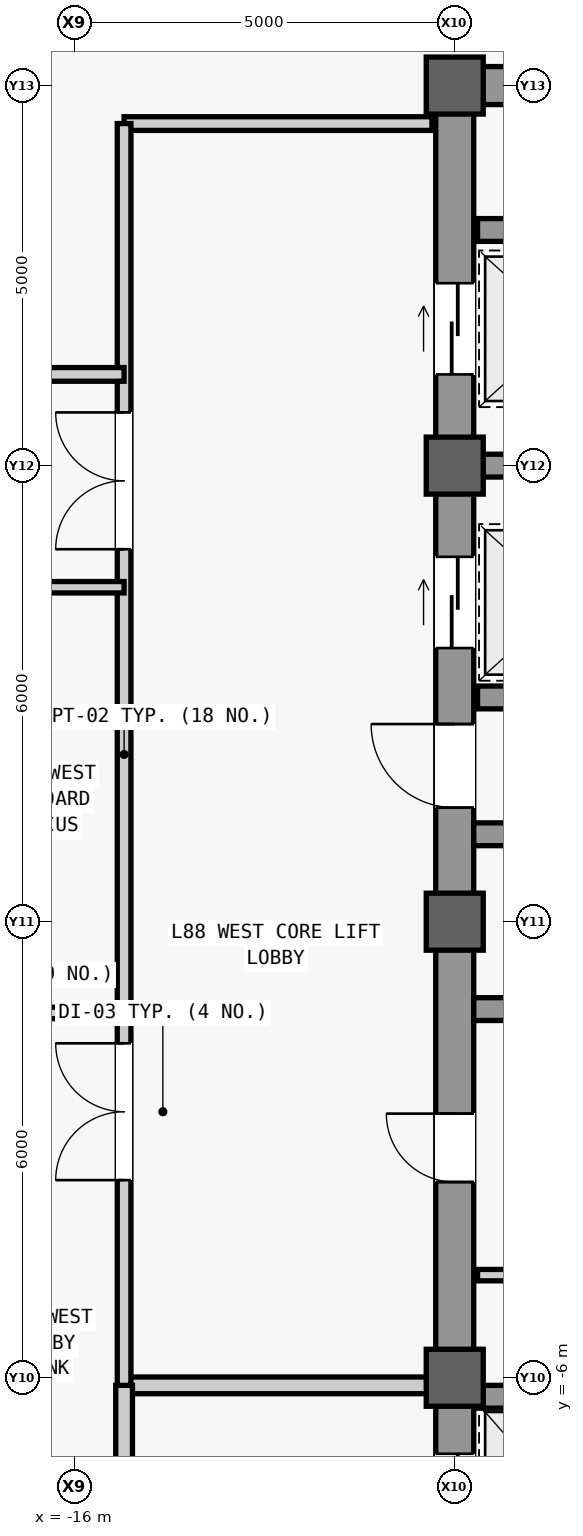
"""IFC4 building model, lengths in metres.
Left out: names, types, materials, properties, quantities, classifications, styles, units other than length and angle.
Written with IfcOpenShell. Run it as: python <this file> out.ifc"""

import sys

from ifc_helpers import new_model, si_unit, direction, frame, frame_2d, origin, origin_2d, place, context, subcontext, project, spatial, rectangle, extrude, source, transform, mapped, element, fill, save


model = new_model("IFC4")
c1 = context("Model", 3, precision=1e-05, world=origin(), true_north=direction((0.0, 1.0)))
c2 = subcontext(c1, "Body", "Model", "MODEL_VIEW")
j1 = project(units=[si_unit("LENGTHUNIT", "METRE"), si_unit("PLANEANGLEUNIT", "RADIAN")], contexts=[c1])
p1 = place(None, origin())
s1 = spatial("IfcSite", under=j1, at=p1, CompositionType="ELEMENT")
p2 = place(p1, origin())
s2 = spatial("IfcBuilding", under=s1, at=p2, CompositionType="ELEMENT")
p3 = place(p2, frame((0.0, 0.0, 370.3)))
s3 = spatial("IfcBuildingStorey", under=s2, at=p3, CompositionType="ELEMENT", Elevation=370.3)
m1 = source(origin(), c2, "Body", "SweptSolid", [
    extrude(rectangle(XDim=22.0, YDim=0.5, at=frame_2d((11.0, 0.0))), origin(), (0.0, 0.0, 1.0), 4.6),
])
p4 = place(p3, frame((-11.0, -11.0, 0.0), z_axis=(0.0, 0.0, 1.0), x_axis=(0.0, 1.0, 0.0)))
e1 = element("IfcWall", 1, at=p4, inside=s3, PredefinedType="SHEAR", context=c2, shape_type="MappedRepresentation", body=[
    mapped(m1, transform((0.0, 0.0, 0.0), scale=1.0)),
])
m2 = source(origin(), c2, "Body", "SweptSolid", [
    extrude(rectangle(XDim=1.1, YDim=2.2, at=frame_2d((0.55, 1.1))), frame((0.0, 0.26, 0.0), z_axis=(0.0, -1.0, 0.0), x_axis=(1.0, 0.0, 0.0)), (0.0, 0.0, 1.0), 0.52),
])
p5 = place(p4, frame((0.8, 0.0, 0.0)))
e2 = element("IfcOpeningElement", 2, at=p5, cuts=e1, PredefinedType="OPENING", context=c2, shape_type="MappedRepresentation", body=[
    mapped(m2, transform((0.0, 0.0, 0.0), scale=1.0)),
])
p6 = place(p4, frame((12.5, 0.0, 0.0)))
e3 = element("IfcOpeningElement", 3, at=p6, cuts=e1, PredefinedType="OPENING", context=c2, shape_type="MappedRepresentation", body=[
    mapped(m2, transform((0.0, 0.0, 0.0), scale=1.0)),
])
m3 = source(origin(), c2, "Body", "SweptSolid", [
    extrude(rectangle(XDim=0.9, YDim=2.15, at=frame_2d((0.45, 1.075))), frame((0.0, 0.26, 0.0), z_axis=(0.0, -1.0, 0.0), x_axis=(1.0, 0.0, 0.0)), (0.0, 0.0, 1.0), 0.52),
])
p7 = place(p4, frame((7.575, 0.0, 0.0)))
e4 = element("IfcOpeningElement", 4, at=p7, cuts=e1, PredefinedType="OPENING", context=c2, shape_type="MappedRepresentation", body=[
    mapped(m3, transform((0.0, 0.0, 0.0), scale=1.0)),
])
m4 = source(origin(), c2, "Body", "SweptSolid", [
    extrude(rectangle(XDim=1.2, YDim=2.3, at=frame_2d((0.6, 1.15))), frame((0.0, 0.26, 0.0), z_axis=(0.0, -1.0, 0.0), x_axis=(1.0, 0.0, 0.0)), (0.0, 0.0, 1.0), 0.52),
])
p8 = place(p4, frame((14.6, 0.0, 0.0)))
e5 = element("IfcOpeningElement", 5, at=p8, cuts=e1, PredefinedType="OPENING", context=c2, shape_type="MappedRepresentation", body=[
    mapped(m4, transform((0.0, 0.0, 0.0), scale=1.0)),
])
p9 = place(p4, frame((18.2, 0.0, 0.0)))
e6 = element("IfcOpeningElement", 6, at=p9, cuts=e1, PredefinedType="OPENING", context=c2, shape_type="MappedRepresentation", body=[
    mapped(m4, transform((0.0, 0.0, 0.0), scale=1.0)),
])
m5 = source(origin(), c2, "Body", "SweptSolid", [
    extrude(rectangle(XDim=1.3, YDim=2.3, at=frame_2d((0.65, 1.15))), frame((0.0, 0.26, 0.0), z_axis=(0.0, -1.0, 0.0), x_axis=(1.0, 0.0, 0.0)), (0.0, 0.0, 1.0), 0.52),
])
p10 = place(p4, frame((2.7, 0.0, 0.0)))
e7 = element("IfcOpeningElement", 7, at=p10, cuts=e1, PredefinedType="OPENING", context=c2, shape_type="MappedRepresentation", body=[
    mapped(m5, transform((0.0, 0.0, 0.0), scale=1.0)),
])
m6 = source(origin(), c2, "Body", "SweptSolid", [
    extrude(rectangle(XDim=5.9, YDim=0.5, at=frame_2d((2.95, 0.0))), origin(), (0.0, 0.0, 1.0), 4.6),
])
p11 = place(p3, frame((-10.75, 11.0, 0.0), z_axis=(0.0, 0.0, 1.0), x_axis=(1.0, 0.0, 0.0)))
e8 = element("IfcWall", 8, at=p11, inside=s3, PredefinedType="SHEAR", context=c2, shape_type="MappedRepresentation", body=[
    mapped(m6, transform((0.0, 0.0, 0.0), scale=1.0)),
])
m7 = source(origin(), c2, "Body", "SweptSolid", [
    extrude(rectangle(XDim=5.65, YDim=0.3, at=frame_2d((2.825, 0.0))), origin(), (0.0, 0.0, 1.0), 4.6),
])
for number, where, z_axis, x_axis in (
    (9, (-10.75, -1.15, 0.0), (0.0, 0.0, 1.0), (1.0, 0.0, 0.0)),
    (10, (-10.75, 1.15, 0.0), (0.0, 0.0, 1.0), (1.0, 0.0, 0.0)),
):
    element("IfcWall", number, at=place(p3, frame(where, z_axis=z_axis, x_axis=x_axis)), inside=s3, PredefinedType="SHEAR", context=c2, shape_type="MappedRepresentation", body=[
        mapped(m7, transform((0.0, 0.0, 0.0), scale=1.0)),
    ])
m8 = source(origin(), c2, "Body", "SweptSolid", [
    extrude(rectangle(XDim=0.75, YDim=0.75, at=origin_2d()), origin(), (0.0, 0.0, 1.0), 5.2),
])
for number, where, z_axis, x_axis in (
    (11, (-11.0, -6.0, 0.0), (0.0, 0.0, 1.0), (1.0, 0.0, 0.0)),
    (12, (-11.0, 0.0, 0.0), (0.0, 0.0, 1.0), (1.0, 0.0, 0.0)),
    (13, (-11.0, 6.0, 0.0), (0.0, 0.0, 1.0), (1.0, 0.0, 0.0)),
    (14, (-11.0, 11.0, 0.0), (0.0, 0.0, 1.0), (1.0, 0.0, 0.0)),
):
    element("IfcColumn", number, at=place(p3, frame(where, z_axis=z_axis, x_axis=x_axis)), inside=s3, PredefinedType="COLUMN", context=c2, shape_type="MappedRepresentation", body=[
        mapped(m8, transform((0.0, 0.0, 0.0), scale=1.0)),
    ])
m9 = source(origin(), c2, "Body", "SweptSolid", [
    extrude(rectangle(XDim=2.2, YDim=0.3, at=frame_2d((1.1, 0.0))), origin(), (0.0, 0.0, 1.0), 4.6),
])
for number, where, z_axis, x_axis in (
    (15, (-10.7, -6.25, 0.0), (0.0, 0.0, 1.0), (1.0, 0.0, 0.0)),
    (16, (-10.7, 2.95, 0.0), (0.0, 0.0, 1.0), (1.0, 0.0, 0.0)),
    (17, (-10.7, 6.0, 0.0), (0.0, 0.0, 1.0), (1.0, 0.0, 0.0)),
    (18, (-10.7, 9.1, 0.0), (0.0, 0.0, 1.0), (1.0, 0.0, 0.0)),
):
    element("IfcWall", number, at=place(p3, frame(where, z_axis=z_axis, x_axis=x_axis)), inside=s3, PredefinedType="SHEAR", context=c2, shape_type="MappedRepresentation", body=[
        mapped(m9, transform((0.0, 0.0, 0.0), scale=1.0)),
    ])
m10 = source(origin(), c2, "Body", "SweptSolid", [
    extrude(rectangle(XDim=2.05, YDim=0.15, at=frame_2d((1.025, 0.0))), origin(), (0.0, 0.0, 1.0), 4.6),
])
p12 = place(p3, frame((-10.7, -4.65, 0.0), z_axis=(0.0, 0.0, 1.0), x_axis=(1.0, 0.0, 0.0)))
e19 = element("IfcWall", 19, at=p12, inside=s3, PredefinedType="PARTITIONING", context=c2, shape_type="MappedRepresentation", body=[
    mapped(m10, transform((0.0, 0.0, 0.0), scale=1.0)),
])
m11 = source(origin(), c2, "Body", "SweptSolid", [
    extrude(rectangle(XDim=4.05, YDim=0.22, at=frame_2d((2.025, 0.0))), origin(), (0.0, 0.0, 1.0), 2.8),
])
p13 = place(p3, frame((-15.35, -6.1, 0.0), z_axis=(0.0, 0.0, 1.0), x_axis=(1.0, 0.0, 0.0)))
e20 = element("IfcWall", 20, at=p13, inside=s3, PredefinedType="PARTITIONING", context=c2, shape_type="MappedRepresentation", body=[
    mapped(m11, transform((0.0, 0.0, 0.0), scale=1.0)),
])
m12 = source(origin(), c2, "Body", "SweptSolid", [
    extrude(rectangle(XDim=4.4, YDim=0.22, at=frame_2d((2.2, 0.0))), origin(), (0.0, 0.0, 1.0), 4.6),
])
p14 = place(p3, frame((-15.35, -10.5, 0.0), z_axis=(0.0, 0.0, 1.0), x_axis=(0.0, 1.0, 0.0)))
e21 = element("IfcWall", 21, at=p14, inside=s3, PredefinedType="PARTITIONING", context=c2, shape_type="MappedRepresentation", body=[
    mapped(m12, transform((0.0, 0.0, 0.0), scale=1.0)),
])
m13 = source(origin(), c2, "Body", "SweptSolid", [
    extrude(rectangle(XDim=1.2, YDim=2.2, at=frame_2d((0.6, 1.1))), frame((0.0, 0.12, 0.0), z_axis=(0.0, -1.0, 0.0), x_axis=(1.0, 0.0, 0.0)), (0.0, 0.0, 1.0), 0.24),
])
p15 = place(p14, frame((1.6, 0.0, 0.0)))
e22 = element("IfcOpeningElement", 22, at=p15, cuts=e21, PredefinedType="OPENING", context=c2, shape_type="MappedRepresentation", body=[
    mapped(m13, transform((0.0, 0.0, 0.0), scale=1.0)),
])
m14 = source(origin(), c2, "Body", "SweptSolid", [
    extrude(rectangle(XDim=4.05, YDim=0.18, at=frame_2d((2.025, 0.0))), origin(), (0.0, 0.0, 1.0), 4.6),
])
p16 = place(p3, frame((-15.35, 10.5, 0.0), z_axis=(0.0, 0.0, 1.0), x_axis=(1.0, 0.0, 0.0)))
e23 = element("IfcWall", 23, at=p16, inside=s3, PredefinedType="PARTITIONING", context=c2, shape_type="MappedRepresentation", body=[
    mapped(m14, transform((0.0, 0.0, 0.0), scale=1.0)),
])
m15 = source(origin(), c2, "Body", "SweptSolid", [
    extrude(rectangle(XDim=16.6, YDim=0.18, at=frame_2d((8.3, 0.0))), origin(), (0.0, 0.0, 1.0), 4.6),
])
p17 = place(p3, frame((-15.35, -6.1, 0.0), z_axis=(0.0, 0.0, 1.0), x_axis=(0.0, 1.0, 0.0)))
e24 = element("IfcWall", 24, at=p17, inside=s3, PredefinedType="PARTITIONING", context=c2, shape_type="MappedRepresentation", body=[
    mapped(m15, transform((0.0, 0.0, 0.0), scale=1.0)),
])
m16 = source(origin(), c2, "Body", "SweptSolid", [
    extrude(rectangle(XDim=1.8, YDim=2.25, at=frame_2d((0.9, 1.125))), frame((0.0, 0.1, 0.0), z_axis=(0.0, -1.0, 0.0), x_axis=(1.0, 0.0, 0.0)), (0.0, 0.0, 1.0), 0.2),
])
p18 = place(p17, frame((2.7, 0.0, 0.0)))
e25 = element("IfcOpeningElement", 25, at=p18, cuts=e24, PredefinedType="OPENING", context=c2, shape_type="MappedRepresentation", body=[
    mapped(m16, transform((0.0, 0.0, 0.0), scale=1.0)),
])
p19 = place(p17, frame((11.0, 0.0, 0.0)))
e26 = element("IfcOpeningElement", 26, at=p19, cuts=e24, PredefinedType="OPENING", context=c2, shape_type="MappedRepresentation", body=[
    mapped(m16, transform((0.0, 0.0, 0.0), scale=1.0)),
])
m17 = source(origin(), c2, "Body", "SweptSolid", [
    extrude(rectangle(XDim=2.05, YDim=0.15, at=frame_2d((1.025, 0.0))), origin(), (0.0, 0.0, 1.0), 4.6),
])
for number, where, z_axis, x_axis in (
    (27, (-17.4, -1.2, 0.0), (0.0, 0.0, 1.0), (1.0, 0.0, 0.0)),
    (28, (-17.4, 4.4, 0.0), (0.0, 0.0, 1.0), (1.0, 0.0, 0.0)),
):
    element("IfcWall", number, at=place(p3, frame(where, z_axis=z_axis, x_axis=x_axis)), inside=s3, PredefinedType="PARTITIONING", context=c2, shape_type="MappedRepresentation", body=[
        mapped(m17, transform((0.0, 0.0, 0.0), scale=1.0)),
    ])
m18 = source(origin(), c2, "Body", "SweptSolid", [
    extrude(rectangle(XDim=2.05, YDim=0.18, at=frame_2d((1.025, 0.0))), origin(), (0.0, 0.0, 1.0), 4.6),
])
p20 = place(p3, frame((-17.4, 7.2, 0.0), z_axis=(0.0, 0.0, 1.0), x_axis=(1.0, 0.0, 0.0)))
e29 = element("IfcWall", 29, at=p20, inside=s3, PredefinedType="PARTITIONING", context=c2, shape_type="MappedRepresentation", body=[
    mapped(m18, transform((0.0, 0.0, 0.0), scale=1.0)),
])
m19 = source(origin(), c2, "Body", "SweptSolid", [
    extrude(rectangle(XDim=1.1, YDim=2.2, at=frame_2d((0.55, 1.1))), frame((0.0, 0.025, 0.0), z_axis=(0.0, -1.0, 0.0), x_axis=(1.0, 0.0, 0.0)), (0.0, 0.0, 1.0), 0.05),
])
p21 = place(p6, origin())
e30 = element("IfcDoor", 30, at=p21, inside=s3, OperationType="SINGLE_SWING_RIGHT", PredefinedType="DOOR", context=c2, shape_type="MappedRepresentation", body=[
    mapped(m19, transform((0.0, 0.0, 0.0), scale=1.0)),
])
fill(e3, e30)
m20 = source(origin(), c2, "Body", "SweptSolid", [
    extrude(rectangle(XDim=0.9, YDim=2.15, at=frame_2d((0.45, 1.075))), frame((0.0, 0.025, 0.0), z_axis=(0.0, -1.0, 0.0), x_axis=(1.0, 0.0, 0.0)), (0.0, 0.0, 1.0), 0.05),
])
p22 = place(p7, origin())
e31 = element("IfcDoor", 31, at=p22, inside=s3, OperationType="SINGLE_SWING_RIGHT", PredefinedType="DOOR", context=c2, shape_type="MappedRepresentation", body=[
    mapped(m20, transform((0.0, 0.0, 0.0), scale=1.0)),
])
fill(e4, e31)
m21 = source(origin(), c2, "Body", "SweptSolid", [
    extrude(rectangle(XDim=1.8, YDim=2.25, at=frame_2d((0.9, 1.125))), frame((0.0, 0.025, 0.0), z_axis=(0.0, -1.0, 0.0), x_axis=(1.0, 0.0, 0.0)), (0.0, 0.0, 1.0), 0.05),
])
p23 = place(p18, origin())
e32 = element("IfcDoor", 32, at=p23, inside=s3, OperationType="SINGLE_SWING_LEFT", PredefinedType="DOOR", context=c2, shape_type="MappedRepresentation", body=[
    mapped(m21, transform((0.0, 0.0, 0.0), scale=1.0)),
])
fill(e25, e32)
p24 = place(p19, origin())
e33 = element("IfcDoor", 33, at=p24, inside=s3, OperationType="SINGLE_SWING_RIGHT", PredefinedType="DOOR", context=c2, shape_type="MappedRepresentation", body=[
    mapped(m21, transform((0.0, 0.0, 0.0), scale=1.0)),
])
fill(e26, e33)
m22 = source(origin(), c2, "Body", "SweptSolid", [
    extrude(rectangle(XDim=1.2, YDim=2.3, at=frame_2d((0.6, 1.15))), frame((0.0, 0.025, 0.0), z_axis=(0.0, -1.0, 0.0), x_axis=(1.0, 0.0, 0.0)), (0.0, 0.0, 1.0), 0.05),
])
p25 = place(p8, origin())
e34 = element("IfcDoor", 34, at=p25, inside=s3, OperationType="SLIDING_TO_LEFT", PredefinedType="DOOR", context=c2, shape_type="MappedRepresentation", body=[
    mapped(m22, transform((0.0, 0.0, 0.0), scale=1.0)),
])
fill(e5, e34)
p26 = place(p9, origin())
e35 = element("IfcDoor", 35, at=p26, inside=s3, OperationType="SLIDING_TO_LEFT", PredefinedType="DOOR", context=c2, shape_type="MappedRepresentation", body=[
    mapped(m22, transform((0.0, 0.0, 0.0), scale=1.0)),
])
fill(e6, e35)
m23 = source(origin(), c2, "Body", "SweptSolid", [
    extrude(rectangle(XDim=1.3, YDim=2.3, at=frame_2d((0.65, 1.15))), frame((0.0, 0.025, 0.0), z_axis=(0.0, -1.0, 0.0), x_axis=(1.0, 0.0, 0.0)), (0.0, 0.0, 1.0), 0.05),
])
p27 = place(p10, origin())
e36 = element("IfcDoor", 36, at=p27, inside=s3, OperationType="SLIDING_TO_LEFT", PredefinedType="DOOR", context=c2, shape_type="MappedRepresentation", body=[
    mapped(m23, transform((0.0, 0.0, 0.0), scale=1.0)),
])
fill(e7, e36)
save(model, sys.argv[1])
